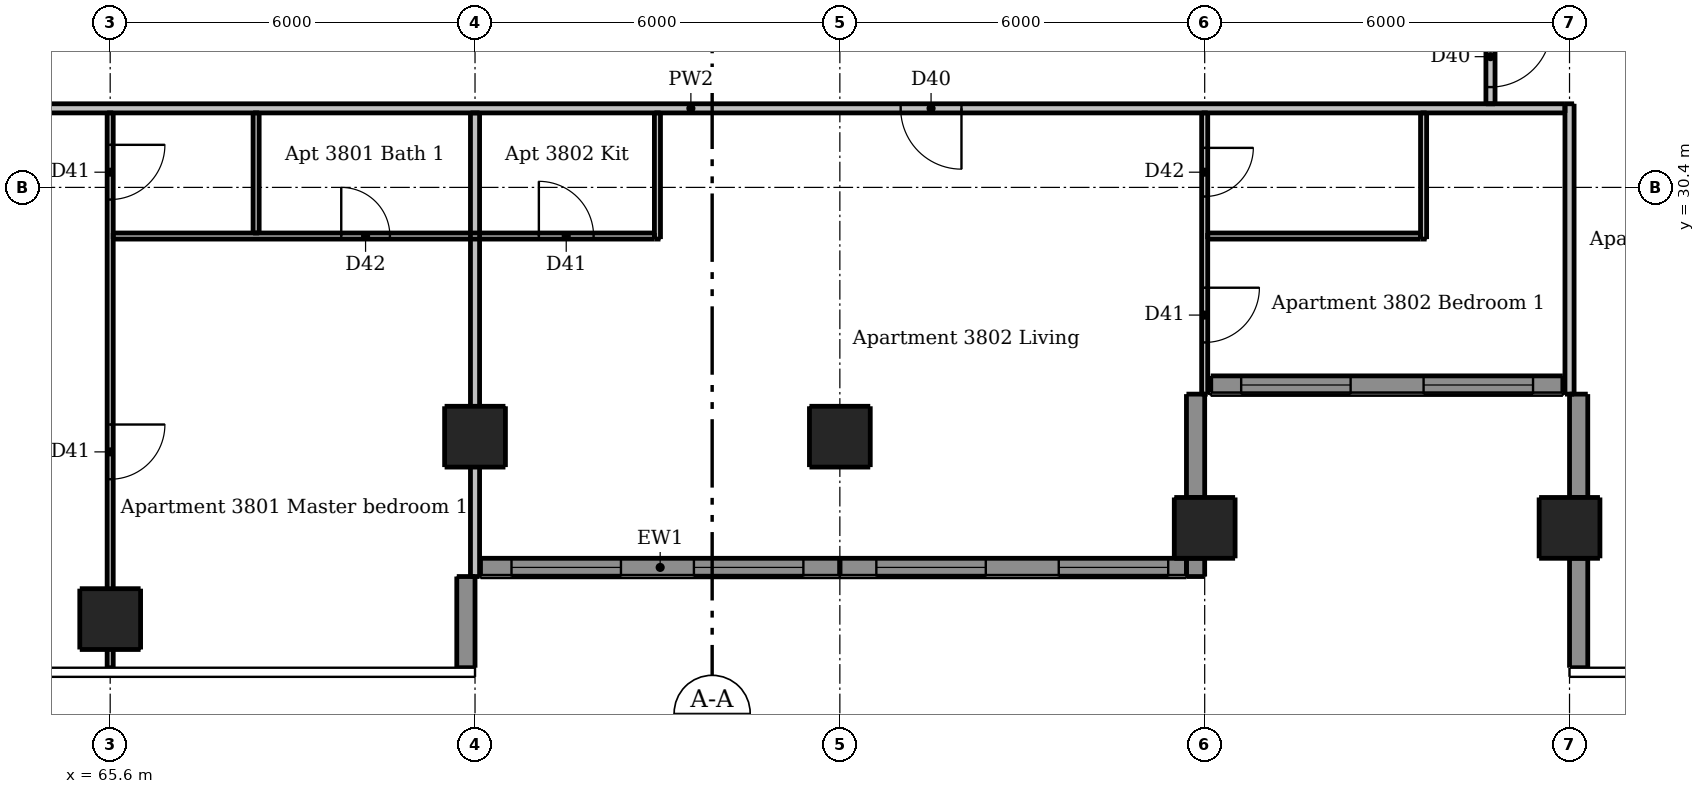
"""IFC4 building model, lengths in metres.
Left out: names, types, materials, properties, quantities, classifications, styles, units other than length and angle.
Written with IfcOpenShell. Run it as: python <this file> out.ifc"""

import sys

from ifc_helpers import new_model, si_unit, direction, frame, frame_2d, origin, origin_2d, place, context, subcontext, project, spatial, rectangle, extrude, element, fill, save


model = new_model("IFC4")
c1 = context("Model", 3, precision=1e-05, world=origin(), true_north=direction((0.0, 1.0)))
c2 = subcontext(c1, "Body", "Model", "MODEL_VIEW")
j1 = project(units=[si_unit("LENGTHUNIT", "METRE"), si_unit("PLANEANGLEUNIT", "RADIAN")], contexts=[c1])
p1 = place(None, origin())
s1 = spatial("IfcSite", under=j1, at=p1, CompositionType="ELEMENT")
p2 = place(p1, origin())
s2 = spatial("IfcBuilding", under=s1, at=p2, CompositionType="ELEMENT")
p3 = place(p2, frame((0.0, 0.0, 143.8)))
s3 = spatial("IfcBuildingStorey", under=s2, at=p3, CompositionType="ELEMENT", Elevation=143.8)
for number, where, z_axis, x_axis in (
    (1, (65.6, 23.3, 0.0), (0.0, 0.0, 1.0), (1.0, 0.0, 0.0)),
    (2, (71.6, 26.3, 0.0), (0.0, 0.0, 1.0), (1.0, 0.0, 0.0)),
    (3, (77.6, 26.3, 0.0), (0.0, 0.0, 1.0), (1.0, 0.0, 0.0)),
    (4, (83.6, 24.8, 0.0), (0.0, 0.0, 1.0), (1.0, 0.0, 0.0)),
    (5, (89.6, 24.8, 0.0), (0.0, 0.0, 1.0), (1.0, 0.0, 0.0)),
):
    element("IfcColumn", number, at=place(p3, frame(where, z_axis=z_axis, x_axis=x_axis)), inside=s3, PredefinedType="COLUMN", context=c2, shape_type="SweptSolid", body=[
        extrude(rectangle(XDim=1.0, YDim=1.0, at=origin_2d()), origin(), (0.0, 0.0, 1.0), 3.05),
    ])
p4 = place(p3, frame((71.45, 22.5, 0.0), z_axis=(0.0, 0.0, 1.0), x_axis=(0.0, 1.0, 0.0)))
e6 = element("IfcWall", 6, at=p4, inside=s3, PredefinedType="SOLIDWALL", context=c2, shape_type="SweptSolid", body=[
    extrude(rectangle(XDim=1.5, YDim=0.3, at=frame_2d((0.75, 0.0))), origin(), (0.0, 0.0, 1.0), 3.05),
])
p5 = place(p3, frame((83.45, 24.0, 0.0), z_axis=(0.0, 0.0, 1.0), x_axis=(0.0, 1.0, 0.0)))
e7 = element("IfcWall", 7, at=p5, inside=s3, PredefinedType="SOLIDWALL", context=c2, shape_type="SweptSolid", body=[
    extrude(rectangle(XDim=0.3, YDim=0.3, at=frame_2d((0.15, 0.0))), origin(), (0.0, 0.0, 1.0), 3.05),
])
for number, where, z_axis, x_axis in (
    (8, (83.45, 25.3, 0.0), (0.0, 0.0, 1.0), (0.0, 1.0, 0.0)),
    (9, (89.75, 27.0, 0.0), (0.0, 0.0, 1.0), (0.0, -1.0, 0.0)),
):
    element("IfcWall", number, at=place(p3, frame(where, z_axis=z_axis, x_axis=x_axis)), inside=s3, PredefinedType="SOLIDWALL", context=c2, shape_type="SweptSolid", body=[
        extrude(rectangle(XDim=1.7, YDim=0.3, at=frame_2d((0.85, 0.0))), origin(), (0.0, 0.0, 1.0), 3.05),
    ])
p6 = place(p3, frame((89.75, 24.3, 0.0), z_axis=(0.0, 0.0, 1.0), x_axis=(0.0, -1.0, 0.0)))
e10 = element("IfcWall", 10, at=p6, inside=s3, PredefinedType="SOLIDWALL", context=c2, shape_type="SweptSolid", body=[
    extrude(rectangle(XDim=1.8, YDim=0.3, at=frame_2d((0.9, 0.0))), origin(), (0.0, 0.0, 1.0), 3.05),
])
p7 = place(p3, frame((71.69, 24.15, 0.0), z_axis=(0.0, 0.0, 1.0), x_axis=(1.0, 0.0, 0.0)))
e11 = element("IfcWall", 11, at=p7, inside=s3, PredefinedType="SOLIDWALL", context=c2, shape_type="SweptSolid", body=[
    extrude(rectangle(XDim=5.91, YDim=0.3, at=frame_2d((2.955, 0.0))), origin(), (0.0, 0.0, 1.0), 3.05),
])
p8 = place(p7, frame((0.51, 0.0, 0.15)))
e12 = element("IfcOpeningElement", 12, at=p8, cuts=e11, PredefinedType="OPENING", context=c2, shape_type="SweptSolid", body=[
    extrude(rectangle(XDim=1.8, YDim=2.1, at=frame_2d((0.9, 1.05))), frame((0.0, 0.16, 0.0), z_axis=(0.0, -1.0, 0.0), x_axis=(1.0, 0.0, 0.0)), (0.0, 0.0, 1.0), 0.32),
])
p9 = place(p7, frame((3.51, 0.0, 0.15)))
e13 = element("IfcOpeningElement", 13, at=p9, cuts=e11, PredefinedType="OPENING", context=c2, shape_type="SweptSolid", body=[
    extrude(rectangle(XDim=1.8, YDim=2.1, at=frame_2d((0.9, 1.05))), frame((0.0, 0.16, 0.0), z_axis=(0.0, -1.0, 0.0), x_axis=(1.0, 0.0, 0.0)), (0.0, 0.0, 1.0), 0.32),
])
p10 = place(p3, frame((77.6, 24.15, 0.0), z_axis=(0.0, 0.0, 1.0), x_axis=(1.0, 0.0, 0.0)))
e14 = element("IfcWall", 14, at=p10, inside=s3, PredefinedType="SOLIDWALL", context=c2, shape_type="SweptSolid", body=[
    extrude(rectangle(XDim=5.7, YDim=0.3, at=frame_2d((2.85, 0.0))), origin(), (0.0, 0.0, 1.0), 3.05),
])
p11 = place(p10, frame((0.6, 0.0, 0.15)))
e15 = element("IfcOpeningElement", 15, at=p11, cuts=e14, PredefinedType="OPENING", context=c2, shape_type="SweptSolid", body=[
    extrude(rectangle(XDim=1.8, YDim=2.1, at=frame_2d((0.9, 1.05))), frame((0.0, 0.16, 0.0), z_axis=(0.0, -1.0, 0.0), x_axis=(1.0, 0.0, 0.0)), (0.0, 0.0, 1.0), 0.32),
])
p12 = place(p10, frame((3.6, 0.0, 0.15)))
e16 = element("IfcOpeningElement", 16, at=p12, cuts=e14, PredefinedType="OPENING", context=c2, shape_type="SweptSolid", body=[
    extrude(rectangle(XDim=1.8, YDim=2.1, at=frame_2d((0.9, 1.05))), frame((0.0, 0.16, 0.0), z_axis=(0.0, -1.0, 0.0), x_axis=(1.0, 0.0, 0.0)), (0.0, 0.0, 1.0), 0.32),
])
p13 = place(p3, frame((83.7, 27.15, 0.0), z_axis=(0.0, 0.0, 1.0), x_axis=(1.0, 0.0, 0.0)))
e17 = element("IfcWall", 17, at=p13, inside=s3, PredefinedType="SOLIDWALL", context=c2, shape_type="SweptSolid", body=[
    extrude(rectangle(XDim=5.79, YDim=0.3, at=frame_2d((2.895, 0.0))), origin(), (0.0, 0.0, 1.0), 3.05),
])
p14 = place(p13, frame((0.5, 0.0, 0.15)))
e18 = element("IfcOpeningElement", 18, at=p14, cuts=e17, PredefinedType="OPENING", context=c2, shape_type="SweptSolid", body=[
    extrude(rectangle(XDim=1.8, YDim=2.1, at=frame_2d((0.9, 1.05))), frame((0.0, 0.16, 0.0), z_axis=(0.0, -1.0, 0.0), x_axis=(1.0, 0.0, 0.0)), (0.0, 0.0, 1.0), 0.32),
])
p15 = place(p13, frame((3.5, 0.0, 0.15)))
e19 = element("IfcOpeningElement", 19, at=p15, cuts=e17, PredefinedType="OPENING", context=c2, shape_type="SweptSolid", body=[
    extrude(rectangle(XDim=1.8, YDim=2.1, at=frame_2d((0.9, 1.05))), frame((0.0, 0.16, 0.0), z_axis=(0.0, -1.0, 0.0), x_axis=(1.0, 0.0, 0.0)), (0.0, 0.0, 1.0), 0.32),
])
p16 = place(p3, frame((65.6, 31.625, 0.0), z_axis=(0.0, 0.0, 1.0), x_axis=(0.0, -1.0, 0.0)))
e20 = element("IfcWall", 20, at=p16, inside=s3, PredefinedType="PARTITIONING", context=c2, shape_type="SweptSolid", body=[
    extrude(rectangle(XDim=9.125, YDim=0.1, at=frame_2d((4.562, 0.0))), origin(), (0.0, 0.0, 1.0), 2.516),
])
p17 = place(p16, frame((0.525, 0.0, 0.0)))
e21 = element("IfcOpeningElement", 21, at=p17, cuts=e20, PredefinedType="OPENING", context=c2, shape_type="SweptSolid", body=[
    extrude(rectangle(XDim=0.9, YDim=2.1, at=frame_2d((0.45, 1.05))), frame((0.0, 0.06, 0.0), z_axis=(0.0, -1.0, 0.0), x_axis=(1.0, 0.0, 0.0)), (0.0, 0.0, 1.0), 0.12),
])
p18 = place(p16, frame((5.125, 0.0, 0.0)))
e22 = element("IfcOpeningElement", 22, at=p18, cuts=e20, PredefinedType="OPENING", context=c2, shape_type="SweptSolid", body=[
    extrude(rectangle(XDim=0.9, YDim=2.1, at=frame_2d((0.45, 1.05))), frame((0.0, 0.06, 0.0), z_axis=(0.0, -1.0, 0.0), x_axis=(1.0, 0.0, 0.0)), (0.0, 0.0, 1.0), 0.12),
])
p19 = place(p3, frame((68.0, 29.65, 0.0), z_axis=(0.0, 0.0, 1.0), x_axis=(0.0, 1.0, 0.0)))
e23 = element("IfcWall", 23, at=p19, inside=s3, PredefinedType="PARTITIONING", context=c2, shape_type="SweptSolid", body=[
    extrude(rectangle(XDim=1.975, YDim=0.1, at=frame_2d((0.988, 0.0))), origin(), (0.0, 0.0, 1.0), 3.05),
])
p20 = place(p3, frame((74.6, 29.55, 0.0), z_axis=(0.0, 0.0, 1.0), x_axis=(0.0, 1.0, 0.0)))
e24 = element("IfcWall", 24, at=p20, inside=s3, PredefinedType="PARTITIONING", context=c2, shape_type="SweptSolid", body=[
    extrude(rectangle(XDim=2.075, YDim=0.1, at=frame_2d((1.038, 0.0))), origin(), (0.0, 0.0, 1.0), 3.05),
])
p21 = place(p3, frame((83.6, 31.625, 0.0), z_axis=(0.0, 0.0, 1.0), x_axis=(0.0, -1.0, 0.0)))
e25 = element("IfcWall", 25, at=p21, inside=s3, PredefinedType="PARTITIONING", context=c2, shape_type="SweptSolid", body=[
    extrude(rectangle(XDim=4.625, YDim=0.1, at=frame_2d((2.312, 0.0))), origin(), (0.0, 0.0, 1.0), 2.59),
])
p22 = place(p21, frame((2.875, 0.0, 0.0)))
e26 = element("IfcOpeningElement", 26, at=p22, cuts=e25, PredefinedType="OPENING", context=c2, shape_type="SweptSolid", body=[
    extrude(rectangle(XDim=0.9, YDim=2.1, at=frame_2d((0.45, 1.05))), frame((0.0, 0.06, 0.0), z_axis=(0.0, -1.0, 0.0), x_axis=(1.0, 0.0, 0.0)), (0.0, 0.0, 1.0), 0.12),
])
p23 = place(p21, frame((0.575, 0.0, 0.0)))
e27 = element("IfcOpeningElement", 27, at=p23, cuts=e25, PredefinedType="OPENING", context=c2, shape_type="SweptSolid", body=[
    extrude(rectangle(XDim=0.8, YDim=2.1, at=frame_2d((0.4, 1.05))), frame((0.0, 0.06, 0.0), z_axis=(0.0, -1.0, 0.0), x_axis=(1.0, 0.0, 0.0)), (0.0, 0.0, 1.0), 0.12),
])
p24 = place(p3, frame((87.2, 29.55, 0.0), z_axis=(0.0, 0.0, 1.0), x_axis=(0.0, 1.0, 0.0)))
e28 = element("IfcWall", 28, at=p24, inside=s3, PredefinedType="PARTITIONING", context=c2, shape_type="SweptSolid", body=[
    extrude(rectangle(XDim=2.075, YDim=0.1, at=frame_2d((1.038, 0.0))), origin(), (0.0, 0.0, 1.0), 3.05),
])
p25 = place(p3, frame((65.65, 29.6, 0.0), z_axis=(0.0, 0.0, 1.0), x_axis=(1.0, 0.0, 0.0)))
e29 = element("IfcWall", 29, at=p25, inside=s3, PredefinedType="PARTITIONING", context=c2, shape_type="SweptSolid", body=[
    extrude(rectangle(XDim=8.9, YDim=0.1, at=frame_2d((4.45, 0.0))), origin(), (0.0, 0.0, 1.0), 3.05),
])
p26 = place(p25, frame((3.75, 0.0, 0.0)))
e30 = element("IfcOpeningElement", 30, at=p26, cuts=e29, PredefinedType="OPENING", context=c2, shape_type="SweptSolid", body=[
    extrude(rectangle(XDim=0.8, YDim=2.1, at=frame_2d((0.4, 1.05))), frame((0.0, 0.06, 0.0), z_axis=(0.0, -1.0, 0.0), x_axis=(1.0, 0.0, 0.0)), (0.0, 0.0, 1.0), 0.12),
])
p27 = place(p25, frame((7.0, 0.0, 0.0)))
e31 = element("IfcOpeningElement", 31, at=p27, cuts=e29, PredefinedType="OPENING", context=c2, shape_type="SweptSolid", body=[
    extrude(rectangle(XDim=0.9, YDim=2.1, at=frame_2d((0.45, 1.05))), frame((0.0, 0.06, 0.0), z_axis=(0.0, -1.0, 0.0), x_axis=(1.0, 0.0, 0.0)), (0.0, 0.0, 1.0), 0.12),
])
p28 = place(p3, frame((83.65, 29.6, 0.0), z_axis=(0.0, 0.0, 1.0), x_axis=(1.0, 0.0, 0.0)))
e32 = element("IfcWall", 32, at=p28, inside=s3, PredefinedType="PARTITIONING", context=c2, shape_type="SweptSolid", body=[
    extrude(rectangle(XDim=3.5, YDim=0.1, at=frame_2d((1.75, 0.0))), origin(), (0.0, 0.0, 1.0), 3.05),
])
p29 = place(p3, frame((71.6, 24.0, 0.0), z_axis=(0.0, 0.0, 1.0), x_axis=(0.0, 1.0, 0.0)))
e33 = element("IfcWall", 33, at=p29, inside=s3, PredefinedType="PARTITIONING", context=c2, shape_type="SweptSolid", body=[
    extrude(rectangle(XDim=7.625, YDim=0.15, at=frame_2d((3.812, 0.0))), origin(), (0.0, 0.0, 1.0), 2.59),
])
p30 = place(p3, frame((88.3, 60.475, 0.0), z_axis=(0.0, 0.0, 1.0), x_axis=(0.0, -1.0, 0.0)))
e34 = element("IfcWall", 34, at=p30, inside=s3, PredefinedType="PARTITIONING", context=c2, shape_type="SweptSolid", body=[
    extrude(rectangle(XDim=28.7, YDim=0.15, at=frame_2d((14.35, 0.0))), origin(), (0.0, 0.0, 1.0), 3.05),
])
p31 = place(p30, frame((27.425, 0.0, 0.0)))
e35 = element("IfcOpeningElement", 35, at=p31, cuts=e34, PredefinedType="OPENING", context=c2, shape_type="SweptSolid", body=[
    extrude(rectangle(XDim=1.0, YDim=2.1, at=frame_2d((0.5, 1.05))), frame((0.0, 0.085, 0.0), z_axis=(0.0, -1.0, 0.0), x_axis=(1.0, 0.0, 0.0)), (0.0, 0.0, 1.0), 0.17),
])
p32 = place(p30, frame((13.075, 0.0, 0.0)))
e36 = element("IfcOpeningElement", 36, at=p32, cuts=e34, PredefinedType="OPENING", context=c2, shape_type="SweptSolid", body=[
    extrude(rectangle(XDim=1.0, YDim=2.1, at=frame_2d((0.5, 1.05))), frame((0.0, 0.085, 0.0), z_axis=(0.0, -1.0, 0.0), x_axis=(1.0, 0.0, 0.0)), (0.0, 0.0, 1.0), 0.17),
])
p33 = place(p30, frame((2.575, 0.0, 0.0)))
e37 = element("IfcOpeningElement", 37, at=p33, cuts=e34, PredefinedType="OPENING", context=c2, shape_type="SweptSolid", body=[
    extrude(rectangle(XDim=1.0, YDim=2.1, at=frame_2d((0.5, 1.05))), frame((0.0, 0.085, 0.0), z_axis=(0.0, -1.0, 0.0), x_axis=(1.0, 0.0, 0.0)), (0.0, 0.0, 1.0), 0.17),
])
p34 = place(p3, frame((89.6, 27.0, 0.0), z_axis=(0.0, 0.0, 1.0), x_axis=(0.0, 1.0, 0.0)))
e38 = element("IfcWall", 38, at=p34, inside=s3, PredefinedType="PARTITIONING", context=c2, shape_type="SweptSolid", body=[
    extrude(rectangle(XDim=4.775, YDim=0.15, at=frame_2d((2.387, 0.0))), origin(), (0.0, 0.0, 1.0), 2.51),
])
p35 = place(p3, frame((89.525, 31.7, 0.0), z_axis=(0.0, 0.0, 1.0), x_axis=(-1.0, 0.0, 0.0)))
e39 = element("IfcWall", 39, at=p35, inside=s3, PredefinedType="PARTITIONING", context=c2, shape_type="SweptSolid", body=[
    extrude(rectangle(XDim=28.75, YDim=0.15, at=frame_2d((14.375, 0.0))), origin(), (0.0, 0.0, 1.0), 3.05),
])
p36 = place(p35, frame((25.875, 0.0, 0.0)))
e40 = element("IfcOpeningElement", 40, at=p36, cuts=e39, PredefinedType="OPENING", context=c2, shape_type="SweptSolid", body=[
    extrude(rectangle(XDim=1.0, YDim=2.1, at=frame_2d((0.5, 1.05))), frame((0.0, 0.085, 0.0), z_axis=(0.0, -1.0, 0.0), x_axis=(1.0, 0.0, 0.0)), (0.0, 0.0, 1.0), 0.17),
])
p37 = place(p35, frame((9.925, 0.0, 0.0)))
e41 = element("IfcOpeningElement", 41, at=p37, cuts=e39, PredefinedType="OPENING", context=c2, shape_type="SweptSolid", body=[
    extrude(rectangle(XDim=1.0, YDim=2.1, at=frame_2d((0.5, 1.05))), frame((0.0, 0.085, 0.0), z_axis=(0.0, -1.0, 0.0), x_axis=(1.0, 0.0, 0.0)), (0.0, 0.0, 1.0), 0.17),
])
p38 = place(p8, origin())
e42 = element("IfcWindow", 42, at=p38, inside=s3, PartitioningType="DOUBLE_PANEL_VERTICAL", PredefinedType="WINDOW", context=c2, shape_type="SweptSolid", body=[
    extrude(rectangle(XDim=1.8, YDim=2.1, at=frame_2d((0.9, 1.05))), frame((0.0, 0.03, 0.0), z_axis=(0.0, -1.0, 0.0), x_axis=(1.0, 0.0, 0.0)), (0.0, 0.0, 1.0), 0.06),
])
fill(e12, e42)
p39 = place(p9, origin())
e43 = element("IfcWindow", 43, at=p39, inside=s3, PartitioningType="DOUBLE_PANEL_VERTICAL", PredefinedType="WINDOW", context=c2, shape_type="SweptSolid", body=[
    extrude(rectangle(XDim=1.8, YDim=2.1, at=frame_2d((0.9, 1.05))), frame((0.0, 0.03, 0.0), z_axis=(0.0, -1.0, 0.0), x_axis=(1.0, 0.0, 0.0)), (0.0, 0.0, 1.0), 0.06),
])
fill(e13, e43)
p40 = place(p11, origin())
e44 = element("IfcWindow", 44, at=p40, inside=s3, PartitioningType="DOUBLE_PANEL_VERTICAL", PredefinedType="WINDOW", context=c2, shape_type="SweptSolid", body=[
    extrude(rectangle(XDim=1.8, YDim=2.1, at=frame_2d((0.9, 1.05))), frame((0.0, 0.03, 0.0), z_axis=(0.0, -1.0, 0.0), x_axis=(1.0, 0.0, 0.0)), (0.0, 0.0, 1.0), 0.06),
])
fill(e15, e44)
p41 = place(p12, origin())
e45 = element("IfcWindow", 45, at=p41, inside=s3, PartitioningType="DOUBLE_PANEL_VERTICAL", PredefinedType="WINDOW", context=c2, shape_type="SweptSolid", body=[
    extrude(rectangle(XDim=1.8, YDim=2.1, at=frame_2d((0.9, 1.05))), frame((0.0, 0.03, 0.0), z_axis=(0.0, -1.0, 0.0), x_axis=(1.0, 0.0, 0.0)), (0.0, 0.0, 1.0), 0.06),
])
fill(e16, e45)
p42 = place(p14, origin())
e46 = element("IfcWindow", 46, at=p42, inside=s3, PartitioningType="DOUBLE_PANEL_VERTICAL", PredefinedType="WINDOW", context=c2, shape_type="SweptSolid", body=[
    extrude(rectangle(XDim=1.8, YDim=2.1, at=frame_2d((0.9, 1.05))), frame((0.0, 0.03, 0.0), z_axis=(0.0, -1.0, 0.0), x_axis=(1.0, 0.0, 0.0)), (0.0, 0.0, 1.0), 0.06),
])
fill(e18, e46)
p43 = place(p15, origin())
e47 = element("IfcWindow", 47, at=p43, inside=s3, PartitioningType="DOUBLE_PANEL_VERTICAL", PredefinedType="WINDOW", context=c2, shape_type="SweptSolid", body=[
    extrude(rectangle(XDim=1.8, YDim=2.1, at=frame_2d((0.9, 1.05))), frame((0.0, 0.03, 0.0), z_axis=(0.0, -1.0, 0.0), x_axis=(1.0, 0.0, 0.0)), (0.0, 0.0, 1.0), 0.06),
])
fill(e19, e47)
p44 = place(p17, origin())
e48 = element("IfcDoor", 48, at=p44, inside=s3, OperationType="SINGLE_SWING_LEFT", PredefinedType="DOOR", context=c2, shape_type="SweptSolid", body=[
    extrude(rectangle(XDim=0.9, YDim=2.1, at=frame_2d((0.45, 1.05))), frame((0.0, 0.025, 0.0), z_axis=(0.0, -1.0, 0.0), x_axis=(1.0, 0.0, 0.0)), (0.0, 0.0, 1.0), 0.05),
])
fill(e21, e48)
p45 = place(p18, origin())
e49 = element("IfcDoor", 49, at=p45, inside=s3, OperationType="SINGLE_SWING_LEFT", PredefinedType="DOOR", context=c2, shape_type="SweptSolid", body=[
    extrude(rectangle(XDim=0.9, YDim=2.1, at=frame_2d((0.45, 1.05))), frame((0.0, 0.025, 0.0), z_axis=(0.0, -1.0, 0.0), x_axis=(1.0, 0.0, 0.0)), (0.0, 0.0, 1.0), 0.05),
])
fill(e22, e49)
p46 = place(p26, origin())
e50 = element("IfcDoor", 50, at=p46, inside=s3, OperationType="SINGLE_SWING_LEFT", PredefinedType="DOOR", context=c2, shape_type="SweptSolid", body=[
    extrude(rectangle(XDim=0.8, YDim=2.1, at=frame_2d((0.4, 1.05))), frame((0.0, 0.025, 0.0), z_axis=(0.0, -1.0, 0.0), x_axis=(1.0, 0.0, 0.0)), (0.0, 0.0, 1.0), 0.05),
])
fill(e30, e50)
p47 = place(p37, origin())
e51 = element("IfcDoor", 51, at=p47, inside=s3, OperationType="SINGLE_SWING_LEFT", PredefinedType="DOOR", context=c2, shape_type="SweptSolid", body=[
    extrude(rectangle(XDim=1.0, YDim=2.1, at=frame_2d((0.5, 1.05))), frame((0.0, 0.025, 0.0), z_axis=(0.0, -1.0, 0.0), x_axis=(1.0, 0.0, 0.0)), (0.0, 0.0, 1.0), 0.05),
])
fill(e41, e51)
p48 = place(p27, origin())
e52 = element("IfcDoor", 52, at=p48, inside=s3, OperationType="SINGLE_SWING_LEFT", PredefinedType="DOOR", context=c2, shape_type="SweptSolid", body=[
    extrude(rectangle(XDim=0.9, YDim=2.1, at=frame_2d((0.45, 1.05))), frame((0.0, 0.025, 0.0), z_axis=(0.0, -1.0, 0.0), x_axis=(1.0, 0.0, 0.0)), (0.0, 0.0, 1.0), 0.05),
])
fill(e31, e52)
p49 = place(p22, origin())
e53 = element("IfcDoor", 53, at=p49, inside=s3, OperationType="SINGLE_SWING_LEFT", PredefinedType="DOOR", context=c2, shape_type="SweptSolid", body=[
    extrude(rectangle(XDim=0.9, YDim=2.1, at=frame_2d((0.45, 1.05))), frame((0.0, 0.025, 0.0), z_axis=(0.0, -1.0, 0.0), x_axis=(1.0, 0.0, 0.0)), (0.0, 0.0, 1.0), 0.05),
])
fill(e26, e53)
p50 = place(p23, origin())
e54 = element("IfcDoor", 54, at=p50, inside=s3, OperationType="SINGLE_SWING_LEFT", PredefinedType="DOOR", context=c2, shape_type="SweptSolid", body=[
    extrude(rectangle(XDim=0.8, YDim=2.1, at=frame_2d((0.4, 1.05))), frame((0.0, 0.025, 0.0), z_axis=(0.0, -1.0, 0.0), x_axis=(1.0, 0.0, 0.0)), (0.0, 0.0, 1.0), 0.05),
])
fill(e27, e54)
p51 = place(p31, origin())
e55 = element("IfcDoor", 55, at=p51, inside=s3, OperationType="SINGLE_SWING_LEFT", PredefinedType="DOOR", context=c2, shape_type="SweptSolid", body=[
    extrude(rectangle(XDim=1.0, YDim=2.1, at=frame_2d((0.5, 1.05))), frame((0.0, 0.025, 0.0), z_axis=(0.0, -1.0, 0.0), x_axis=(1.0, 0.0, 0.0)), (0.0, 0.0, 1.0), 0.05),
])
fill(e35, e55)
save(model, sys.argv[1])
